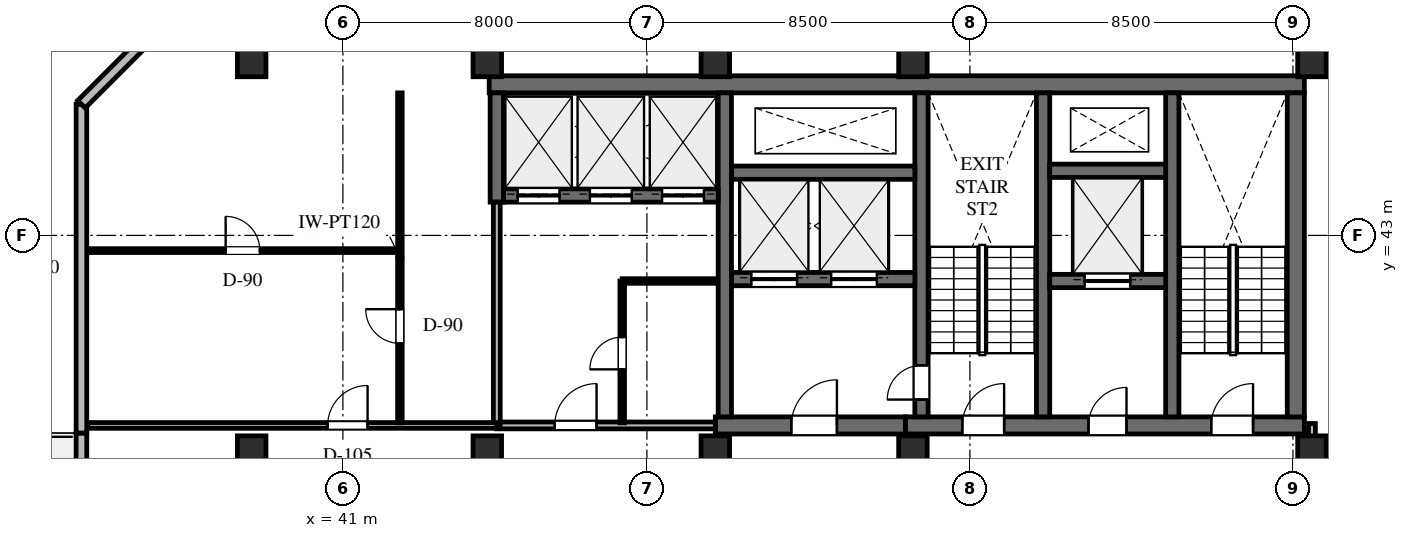
"""IFC4 building model, lengths in metres.
Left out: names, types, materials, properties, quantities, classifications, styles, units other than length and angle.
Written with IfcOpenShell. Run it as: python <this file> out.ifc"""

import sys

from ifc_helpers import new_model, si_unit, direction, frame, frame_2d, origin, origin_2d, place, context, subcontext, project, spatial, rectangle, extrude, element, fill, save


model = new_model("IFC4")
c1 = context("Model", 3, precision=1e-05, world=origin(), true_north=direction((0.0, 1.0)))
c2 = subcontext(c1, "Body", "Model", "MODEL_VIEW")
j1 = project(units=[si_unit("LENGTHUNIT", "METRE"), si_unit("PLANEANGLEUNIT", "RADIAN")], contexts=[c1])
p1 = place(None, origin())
s1 = spatial("IfcSite", under=j1, at=p1, CompositionType="ELEMENT")
p2 = place(p1, origin())
s2 = spatial("IfcBuilding", under=s1, at=p2, CompositionType="ELEMENT")
p3 = place(p2, frame((0.0, 0.0, 296.7)))
s3 = spatial("IfcBuildingStorey", under=s2, at=p3, CompositionType="ELEMENT", Elevation=296.7)
p4 = place(p3, frame((44.85, 46.975, 0.0), z_axis=(0.0, 0.0, 1.0), x_axis=(1.0, 0.0, 0.0)))
e1 = element("IfcWall", 1, at=p4, inside=s3, PredefinedType="SHEAR", context=c2, shape_type="SweptSolid", body=[
    extrude(rectangle(XDim=21.45, YDim=0.45, at=frame_2d((10.725, 0.0))), origin(), (0.0, 0.0, 1.0), 3.6),
])
p5 = place(p3, frame((55.8, 38.0, 0.0), z_axis=(0.0, 0.0, 1.0), x_axis=(1.0, 0.0, 0.0)))
e2 = element("IfcWall", 2, at=p5, inside=s3, PredefinedType="SHEAR", context=c2, shape_type="SweptSolid", body=[
    extrude(rectangle(XDim=10.5, YDim=0.45, at=frame_2d((5.25, 0.0))), origin(), (0.0, 0.0, 1.0), 3.6),
])
p6 = place(p5, frame((1.5, 0.0, 0.0)))
e3 = element("IfcOpeningElement", 3, at=p6, cuts=e2, PredefinedType="OPENING", context=c2, shape_type="SweptSolid", body=[
    extrude(rectangle(XDim=1.1, YDim=2.2, at=frame_2d((0.55, 1.1))), frame((0.0, 0.235, 0.0), z_axis=(0.0, -1.0, 0.0), x_axis=(1.0, 0.0, 0.0)), (0.0, 0.0, 1.0), 0.47),
])
p7 = place(p5, frame((4.82, 0.0, 0.0)))
e4 = element("IfcOpeningElement", 4, at=p7, cuts=e2, PredefinedType="OPENING", context=c2, shape_type="SweptSolid", body=[
    extrude(rectangle(XDim=1.0, YDim=2.15, at=frame_2d((0.5, 1.075))), frame((0.0, 0.235, 0.0), z_axis=(0.0, -1.0, 0.0), x_axis=(1.0, 0.0, 0.0)), (0.0, 0.0, 1.0), 0.47),
])
p8 = place(p5, frame((8.05, 0.0, 0.0)))
e5 = element("IfcOpeningElement", 5, at=p8, cuts=e2, PredefinedType="OPENING", context=c2, shape_type="SweptSolid", body=[
    extrude(rectangle(XDim=1.1, YDim=2.2, at=frame_2d((0.55, 1.1))), frame((0.0, 0.235, 0.0), z_axis=(0.0, -1.0, 0.0), x_axis=(1.0, 0.0, 0.0)), (0.0, 0.0, 1.0), 0.47),
])
p9 = place(p3, frame((66.075, 38.225, 0.0), z_axis=(0.0, 0.0, 1.0), x_axis=(0.0, 1.0, 0.0)))
e6 = element("IfcWall", 6, at=p9, inside=s3, PredefinedType="SHEAR", context=c2, shape_type="SweptSolid", body=[
    extrude(rectangle(XDim=8.525, YDim=0.45, at=frame_2d((4.262, 0.0))), origin(), (0.0, 0.0, 1.0), 3.6),
])
for number, where, z_axis, x_axis in (
    (7, (62.825, 38.225, 0.0), (0.0, 0.0, 1.0), (0.0, 1.0, 0.0)),
    (8, (59.425, 38.225, 0.0), (0.0, 0.0, 1.0), (0.0, 1.0, 0.0)),
):
    element("IfcWall", number, at=place(p3, frame(where, z_axis=z_axis, x_axis=x_axis)), inside=s3, PredefinedType="SHEAR", context=c2, shape_type="SweptSolid", body=[
        extrude(rectangle(XDim=8.525, YDim=0.35, at=frame_2d((4.262, 0.0))), origin(), (0.0, 0.0, 1.0), 3.6),
    ])
p10 = place(p3, frame((56.225, 38.225, 0.0), z_axis=(0.0, 0.0, 1.0), x_axis=(0.0, 1.0, 0.0)))
e9 = element("IfcWall", 9, at=p10, inside=s3, PredefinedType="SHEAR", context=c2, shape_type="SweptSolid", body=[
    extrude(rectangle(XDim=8.525, YDim=0.35, at=frame_2d((4.262, 0.0))), origin(), (0.0, 0.0, 1.0), 3.6),
])
p11 = place(p10, frame((0.455, 0.0, 0.0)))
e10 = element("IfcOpeningElement", 10, at=p11, cuts=e9, PredefinedType="OPENING", context=c2, shape_type="SweptSolid", body=[
    extrude(rectangle(XDim=0.9, YDim=2.15, at=frame_2d((0.45, 1.075))), frame((0.0, 0.185, 0.0), z_axis=(0.0, -1.0, 0.0), x_axis=(1.0, 0.0, 0.0)), (0.0, 0.0, 1.0), 0.37),
])
p12 = place(p3, frame((59.6, 41.8, 0.0), z_axis=(0.0, 0.0, 1.0), x_axis=(1.0, 0.0, 0.0)))
e11 = element("IfcWall", 11, at=p12, inside=s3, PredefinedType="SHEAR", context=c2, shape_type="SweptSolid", body=[
    extrude(rectangle(XDim=3.05, YDim=0.35, at=frame_2d((1.525, 0.0))), origin(), (0.0, 0.0, 1.0), 3.6),
])
p13 = place(p12, frame((0.92, 0.0, 0.0)))
e12 = element("IfcOpeningElement", 12, at=p13, cuts=e11, PredefinedType="OPENING", context=c2, shape_type="SweptSolid", body=[
    extrude(rectangle(XDim=1.2, YDim=2.2, at=frame_2d((0.6, 1.1))), frame((0.0, 0.185, 0.0), z_axis=(0.0, -1.0, 0.0), x_axis=(1.0, 0.0, 0.0)), (0.0, 0.0, 1.0), 0.37),
])
p14 = place(p3, frame((59.6, 44.7, 0.0), z_axis=(0.0, 0.0, 1.0), x_axis=(1.0, 0.0, 0.0)))
e13 = element("IfcWall", 13, at=p14, inside=s3, PredefinedType="SHEAR", context=c2, shape_type="SweptSolid", body=[
    extrude(rectangle(XDim=3.05, YDim=0.35, at=frame_2d((1.525, 0.0))), origin(), (0.0, 0.0, 1.0), 3.6),
])
p15 = place(p3, frame((50.8, 38.0, 0.0), z_axis=(0.0, 0.0, 1.0), x_axis=(1.0, 0.0, 0.0)))
e14 = element("IfcWall", 14, at=p15, inside=s3, PredefinedType="SHEAR", context=c2, shape_type="SweptSolid", body=[
    extrude(rectangle(XDim=5.0, YDim=0.45, at=frame_2d((2.5, 0.0))), origin(), (0.0, 0.0, 1.0), 3.6),
])
p16 = place(p15, frame((2.0, 0.0, 0.0)))
e15 = element("IfcOpeningElement", 15, at=p16, cuts=e14, PredefinedType="OPENING", context=c2, shape_type="SweptSolid", body=[
    extrude(rectangle(XDim=1.2, YDim=2.2, at=frame_2d((0.6, 1.1))), frame((0.0, 0.235, 0.0), z_axis=(0.0, -1.0, 0.0), x_axis=(1.0, 0.0, 0.0)), (0.0, 0.0, 1.0), 0.47),
])
p17 = place(p3, frame((51.225, 41.85, 0.0), z_axis=(0.0, 0.0, 1.0), x_axis=(1.0, 0.0, 0.0)))
e16 = element("IfcWall", 16, at=p17, inside=s3, PredefinedType="SHEAR", context=c2, shape_type="SweptSolid", body=[
    extrude(rectangle(XDim=4.825, YDim=0.35, at=frame_2d((2.413, 0.0))), origin(), (0.0, 0.0, 1.0), 3.6),
])
p18 = place(p17, frame((0.525, 0.0, 0.0)))
e17 = element("IfcOpeningElement", 17, at=p18, cuts=e16, PredefinedType="OPENING", context=c2, shape_type="SweptSolid", body=[
    extrude(rectangle(XDim=1.2, YDim=2.2, at=frame_2d((0.6, 1.1))), frame((0.0, 0.185, 0.0), z_axis=(0.0, -1.0, 0.0), x_axis=(1.0, 0.0, 0.0)), (0.0, 0.0, 1.0), 0.37),
])
p19 = place(p17, frame((2.625, 0.0, 0.0)))
e18 = element("IfcOpeningElement", 18, at=p19, cuts=e16, PredefinedType="OPENING", context=c2, shape_type="SweptSolid", body=[
    extrude(rectangle(XDim=1.2, YDim=2.2, at=frame_2d((0.6, 1.1))), frame((0.0, 0.185, 0.0), z_axis=(0.0, -1.0, 0.0), x_axis=(1.0, 0.0, 0.0)), (0.0, 0.0, 1.0), 0.37),
])
p20 = place(p3, frame((51.225, 44.65, 0.0), z_axis=(0.0, 0.0, 1.0), x_axis=(1.0, 0.0, 0.0)))
e19 = element("IfcWall", 19, at=p20, inside=s3, PredefinedType="SHEAR", context=c2, shape_type="SweptSolid", body=[
    extrude(rectangle(XDim=4.825, YDim=0.35, at=frame_2d((2.413, 0.0))), origin(), (0.0, 0.0, 1.0), 3.6),
])
p21 = place(p3, frame((51.05, 38.225, 0.0), z_axis=(0.0, 0.0, 1.0), x_axis=(0.0, 1.0, 0.0)))
e20 = element("IfcWall", 20, at=p21, inside=s3, PredefinedType="SHEAR", context=c2, shape_type="SweptSolid", body=[
    extrude(rectangle(XDim=8.525, YDim=0.35, at=frame_2d((4.262, 0.0))), origin(), (0.0, 0.0, 1.0), 3.6),
])
p22 = place(p3, frame((45.225, 44.05, 0.0), z_axis=(0.0, 0.0, 1.0), x_axis=(1.0, 0.0, 0.0)))
e21 = element("IfcWall", 21, at=p22, inside=s3, PredefinedType="SHEAR", context=c2, shape_type="SweptSolid", body=[
    extrude(rectangle(XDim=5.65, YDim=0.35, at=frame_2d((2.825, 0.0))), origin(), (0.0, 0.0, 1.0), 3.6),
])
p23 = place(p22, frame((0.375, 0.0, 0.0)))
e22 = element("IfcOpeningElement", 22, at=p23, cuts=e21, PredefinedType="OPENING", context=c2, shape_type="SweptSolid", body=[
    extrude(rectangle(XDim=1.1, YDim=2.2, at=frame_2d((0.55, 1.1))), frame((0.0, 0.185, 0.0), z_axis=(0.0, -1.0, 0.0), x_axis=(1.0, 0.0, 0.0)), (0.0, 0.0, 1.0), 0.37),
])
p24 = place(p22, frame((2.275, 0.0, 0.0)))
e23 = element("IfcOpeningElement", 23, at=p24, cuts=e21, PredefinedType="OPENING", context=c2, shape_type="SweptSolid", body=[
    extrude(rectangle(XDim=1.1, YDim=2.2, at=frame_2d((0.55, 1.1))), frame((0.0, 0.185, 0.0), z_axis=(0.0, -1.0, 0.0), x_axis=(1.0, 0.0, 0.0)), (0.0, 0.0, 1.0), 0.37),
])
p25 = place(p22, frame((4.175, 0.0, 0.0)))
e24 = element("IfcOpeningElement", 24, at=p25, cuts=e21, PredefinedType="OPENING", context=c2, shape_type="SweptSolid", body=[
    extrude(rectangle(XDim=1.1, YDim=2.2, at=frame_2d((0.55, 1.1))), frame((0.0, 0.185, 0.0), z_axis=(0.0, -1.0, 0.0), x_axis=(1.0, 0.0, 0.0)), (0.0, 0.0, 1.0), 0.37),
])
p26 = place(p3, frame((45.05, 43.875, 0.0), z_axis=(0.0, 0.0, 1.0), x_axis=(0.0, 1.0, 0.0)))
e25 = element("IfcWall", 25, at=p26, inside=s3, PredefinedType="SHEAR", context=c2, shape_type="SweptSolid", body=[
    extrude(rectangle(XDim=2.875, YDim=0.35, at=frame_2d((1.438, 0.0))), origin(), (0.0, 0.0, 1.0), 3.6),
])
for number, where, z_axis, x_axis in (
    (26, (66.5, 47.55, 0.0), (0.0, 0.0, 1.0), (1.0, 0.0, 0.0)),
    (27, (56.0, 47.55, 0.0), (0.0, 0.0, 1.0), (1.0, 0.0, 0.0)),
    (28, (66.5, 37.35, 0.0), (0.0, 0.0, 1.0), (1.0, 0.0, 0.0)),
    (29, (56.0, 37.35, 0.0), (0.0, 0.0, 1.0), (1.0, 0.0, 0.0)),
    (30, (50.8, 47.55, 0.0), (0.0, 0.0, 1.0), (1.0, 0.0, 0.0)),
    (31, (50.8, 37.35, 0.0), (0.0, 0.0, 1.0), (1.0, 0.0, 0.0)),
    (32, (44.8, 37.35, 0.0), (0.0, 0.0, 1.0), (1.0, 0.0, 0.0)),
    (33, (44.8, 47.55, 0.0), (0.0, 0.0, 1.0), (1.0, 0.0, 0.0)),
    (34, (38.6, 37.35, 0.0), (0.0, 0.0, 1.0), (1.0, 0.0, 0.0)),
    (35, (38.6, 47.55, 0.0), (0.0, 0.0, 1.0), (1.0, 0.0, 0.0)),
):
    element("IfcColumn", number, at=place(p3, frame(where, z_axis=z_axis, x_axis=x_axis)), inside=s3, PredefinedType="COLUMN", context=c2, shape_type="SweptSolid", body=[
        extrude(rectangle(XDim=0.75, YDim=0.75, at=origin_2d()), origin(), (0.0, 0.0, 1.0), 3.6),
    ])
p27 = place(p3, frame((34.12, 20.7, 0.0), z_axis=(0.0, 0.0, 1.0), x_axis=(0.0, 1.0, 0.0)))
e36 = element("IfcWall", 36, at=p27, inside=s3, PredefinedType="STANDARD", context=c2, shape_type="SweptSolid", body=[
    extrude(rectangle(XDim=17.1, YDim=0.28, at=frame_2d((8.55, 0.0))), origin(), (0.0, 0.0, 1.0), 3.365),
])
p28 = place(p27, frame((7.94, 0.0, 0.0)))
e37 = element("IfcOpeningElement", 37, at=p28, cuts=e36, PredefinedType="OPENING", context=c2, shape_type="SweptSolid", body=[
    extrude(rectangle(XDim=1.1, YDim=2.2, at=frame_2d((0.55, 1.1))), frame((0.0, 0.15, 0.0), z_axis=(0.0, -1.0, 0.0), x_axis=(1.0, 0.0, 0.0)), (0.0, 0.0, 1.0), 0.3),
])
p29 = place(p27, frame((2.897, 0.0, 0.65)))
e38 = element("IfcOpeningElement", 38, at=p29, cuts=e36, PredefinedType="OPENING", context=c2, shape_type="SweptSolid", body=[
    extrude(rectangle(XDim=1.8, YDim=2.1, at=frame_2d((0.9, 1.05))), frame((0.0, 0.15, 0.0), z_axis=(0.0, -1.0, 0.0), x_axis=(1.0, 0.0, 0.0)), (0.0, 0.0, 1.0), 0.3),
])
p30 = place(p3, frame((34.12, 37.8, 0.0), z_axis=(0.0, 0.0, 1.0), x_axis=(0.0, 1.0, 0.0)))
e39 = element("IfcWall", 39, at=p30, inside=s3, PredefinedType="STANDARD", context=c2, shape_type="SweptSolid", body=[
    extrude(rectangle(XDim=8.65, YDim=0.28, at=frame_2d((4.325, 0.0))), origin(), (0.0, 0.0, 1.0), 3.365),
])
p31 = place(p3, frame((34.12, 46.45, 0.0), z_axis=(0.0, 0.0, 1.0), x_axis=(0.707106781187, 0.707106781187, 0.0)))
e40 = element("IfcWall", 40, at=p31, inside=s3, PredefinedType="STANDARD", context=c2, shape_type="SweptSolid", body=[
    extrude(rectangle(XDim=2.729, YDim=0.28, at=frame_2d((1.365, 0.0))), origin(), (0.0, 0.0, 1.0), 3.365),
])
p32 = place(p3, frame((45.05, 38.0, 0.0), z_axis=(0.0, 0.0, 1.0), x_axis=(1.0, 0.0, 0.0)))
e41 = element("IfcWall", 41, at=p32, inside=s3, PredefinedType="STANDARD", context=c2, shape_type="SweptSolid", body=[
    extrude(rectangle(XDim=5.75, YDim=0.18, at=frame_2d((2.875, 0.0))), origin(), (0.0, 0.0, 1.0), 2.754),
])
p33 = place(p32, frame((1.525, 0.0, 0.0)))
e42 = element("IfcOpeningElement", 42, at=p33, cuts=e41, PredefinedType="OPENING", context=c2, shape_type="SweptSolid", body=[
    extrude(rectangle(XDim=1.1, YDim=2.2, at=frame_2d((0.55, 1.1))), frame((0.0, 0.1, 0.0), z_axis=(0.0, -1.0, 0.0), x_axis=(1.0, 0.0, 0.0)), (0.0, 0.0, 1.0), 0.2),
])
p34 = place(p3, frame((48.35, 38.068, 0.0), z_axis=(0.0, 0.0, 1.0), x_axis=(0.0, 1.0, 0.0)))
e43 = element("IfcWall", 43, at=p34, inside=s3, PredefinedType="PARTITIONING", context=c2, shape_type="SweptSolid", body=[
    extrude(rectangle(XDim=3.732, YDim=0.12, at=frame_2d((1.866, 0.0))), origin(), (0.0, 0.0, 1.0), 3.365),
])
p35 = place(p34, frame((1.407, 0.0, 0.0)))
e44 = element("IfcOpeningElement", 44, at=p35, cuts=e43, PredefinedType="OPENING", context=c2, shape_type="SweptSolid", body=[
    extrude(rectangle(XDim=0.85, YDim=2.1, at=frame_2d((0.425, 1.05))), frame((0.0, 0.07, 0.0), z_axis=(0.0, -1.0, 0.0), x_axis=(1.0, 0.0, 0.0)), (0.0, 0.0, 1.0), 0.14),
])
p36 = place(p3, frame((48.35, 41.8, 0.0), z_axis=(0.0, 0.0, 1.0), x_axis=(1.0, 0.0, 0.0)))
e45 = element("IfcWall", 45, at=p36, inside=s3, PredefinedType="PARTITIONING", context=c2, shape_type="SweptSolid", body=[
    extrude(rectangle(XDim=2.5, YDim=0.12, at=frame_2d((1.25, 0.0))), origin(), (0.0, 0.0, 1.0), 2.754),
])
p37 = place(p3, frame((45.05, 38.0, 0.0), z_axis=(0.0, 0.0, 1.0), x_axis=(0.0, 1.0, 0.0)))
e46 = element("IfcWall", 46, at=p37, inside=s3, PredefinedType="STANDARD", context=c2, shape_type="SweptSolid", body=[
    extrude(rectangle(XDim=5.875, YDim=0.18, at=frame_2d((2.938, 0.0))), origin(), (0.0, 0.0, 1.0), 2.754),
])
p38 = place(p3, frame((34.285, 38.0, 0.0), z_axis=(0.0, 0.0, 1.0), x_axis=(1.0, 0.0, 0.0)))
e47 = element("IfcWall", 47, at=p38, inside=s3, PredefinedType="PARTITIONING", context=c2, shape_type="SweptSolid", body=[
    extrude(rectangle(XDim=10.765, YDim=0.15, at=frame_2d((5.383, 0.0))), origin(), (0.0, 0.0, 1.0), 2.754),
])
p39 = place(p38, frame((6.315, 0.0, 0.0)))
e48 = element("IfcOpeningElement", 48, at=p39, cuts=e47, PredefinedType="OPENING", context=c2, shape_type="SweptSolid", body=[
    extrude(rectangle(XDim=1.05, YDim=2.2, at=frame_2d((0.525, 1.1))), frame((0.0, 0.085, 0.0), z_axis=(0.0, -1.0, 0.0), x_axis=(1.0, 0.0, 0.0)), (0.0, 0.0, 1.0), 0.17),
])
p40 = place(p3, frame((42.5, 38.068, 0.0), z_axis=(0.0, 0.0, 1.0), x_axis=(0.0, 1.0, 0.0)))
e49 = element("IfcWall", 49, at=p40, inside=s3, PredefinedType="PARTITIONING", context=c2, shape_type="SweptSolid", body=[
    extrude(rectangle(XDim=8.682, YDim=0.12, at=frame_2d((4.341, 0.0))), origin(), (0.0, 0.0, 1.0), 3.365),
])
p41 = place(p40, frame((2.091, 0.0, 0.0)))
e50 = element("IfcOpeningElement", 50, at=p41, cuts=e49, PredefinedType="OPENING", context=c2, shape_type="SweptSolid", body=[
    extrude(rectangle(XDim=0.9, YDim=2.1, at=frame_2d((0.45, 1.05))), frame((0.0, 0.07, 0.0), z_axis=(0.0, -1.0, 0.0), x_axis=(1.0, 0.0, 0.0)), (0.0, 0.0, 1.0), 0.14),
])
p42 = place(p3, frame((34.378, 42.6, 0.0), z_axis=(0.0, 0.0, 1.0), x_axis=(1.0, 0.0, 0.0)))
e51 = element("IfcWall", 51, at=p42, inside=s3, PredefinedType="PARTITIONING", context=c2, shape_type="SweptSolid", body=[
    extrude(rectangle(XDim=8.054, YDim=0.1, at=frame_2d((4.027, 0.0))), origin(), (0.0, 0.0, 1.0), 2.754),
])
p43 = place(p42, frame((3.537, 0.0, 0.0)))
e52 = element("IfcOpeningElement", 52, at=p43, cuts=e51, PredefinedType="OPENING", context=c2, shape_type="SweptSolid", body=[
    extrude(rectangle(XDim=0.9, YDim=2.1, at=frame_2d((0.45, 1.05))), frame((0.0, 0.06, 0.0), z_axis=(0.0, -1.0, 0.0), x_axis=(1.0, 0.0, 0.0)), (0.0, 0.0, 1.0), 0.12),
])
p44 = place(p3, frame((66.5, 35.468, 0.0), z_axis=(0.0, 0.0, 1.0), x_axis=(0.0, 1.0, 0.0)))
e53 = element("IfcWall", 53, at=p44, inside=s3, PredefinedType="STANDARD", context=c2, shape_type="SweptSolid", body=[
    extrude(rectangle(XDim=2.582, YDim=0.18, at=frame_2d((1.291, 0.0))), origin(), (0.0, 0.0, 1.0), 2.754),
])
p45 = place(p6, origin())
e54 = element("IfcDoor", 54, at=p45, inside=s3, OperationType="SINGLE_SWING_RIGHT", PredefinedType="DOOR", context=c2, shape_type="SweptSolid", body=[
    extrude(rectangle(XDim=1.1, YDim=2.2, at=frame_2d((0.55, 1.1))), frame((0.0, 0.025, 0.0), z_axis=(0.0, -1.0, 0.0), x_axis=(1.0, 0.0, 0.0)), (0.0, 0.0, 1.0), 0.05),
])
fill(e3, e54)
p46 = place(p7, origin())
e55 = element("IfcDoor", 55, at=p46, inside=s3, OperationType="SINGLE_SWING_RIGHT", PredefinedType="DOOR", context=c2, shape_type="SweptSolid", body=[
    extrude(rectangle(XDim=1.0, YDim=2.15, at=frame_2d((0.5, 1.075))), frame((0.0, 0.025, 0.0), z_axis=(0.0, -1.0, 0.0), x_axis=(1.0, 0.0, 0.0)), (0.0, 0.0, 1.0), 0.05),
])
fill(e4, e55)
p47 = place(p8, origin())
e56 = element("IfcDoor", 56, at=p47, inside=s3, OperationType="SINGLE_SWING_RIGHT", PredefinedType="DOOR", context=c2, shape_type="SweptSolid", body=[
    extrude(rectangle(XDim=1.1, YDim=2.2, at=frame_2d((0.55, 1.1))), frame((0.0, 0.025, 0.0), z_axis=(0.0, -1.0, 0.0), x_axis=(1.0, 0.0, 0.0)), (0.0, 0.0, 1.0), 0.05),
])
fill(e5, e56)
p48 = place(p16, origin())
e57 = element("IfcDoor", 57, at=p48, inside=s3, OperationType="SINGLE_SWING_RIGHT", PredefinedType="DOOR", context=c2, shape_type="SweptSolid", body=[
    extrude(rectangle(XDim=1.2, YDim=2.2, at=frame_2d((0.6, 1.1))), frame((0.0, 0.025, 0.0), z_axis=(0.0, -1.0, 0.0), x_axis=(1.0, 0.0, 0.0)), (0.0, 0.0, 1.0), 0.05),
])
fill(e15, e57)
p49 = place(p11, origin())
e58 = element("IfcDoor", 58, at=p49, inside=s3, OperationType="SINGLE_SWING_LEFT", PredefinedType="DOOR", context=c2, shape_type="SweptSolid", body=[
    extrude(rectangle(XDim=0.9, YDim=2.15, at=frame_2d((0.45, 1.075))), frame((0.0, 0.025, 0.0), z_axis=(0.0, -1.0, 0.0), x_axis=(1.0, 0.0, 0.0)), (0.0, 0.0, 1.0), 0.05),
])
fill(e10, e58)
p50 = place(p23, origin())
e59 = element("IfcDoor", 59, at=p50, inside=s3, OperationType="DOUBLE_DOOR_SLIDING", PredefinedType="DOOR", context=c2, shape_type="SweptSolid", body=[
    extrude(rectangle(XDim=1.1, YDim=2.2, at=frame_2d((0.55, 1.1))), frame((0.0, 0.025, 0.0), z_axis=(0.0, -1.0, 0.0), x_axis=(1.0, 0.0, 0.0)), (0.0, 0.0, 1.0), 0.05),
])
fill(e22, e59)
p51 = place(p24, origin())
e60 = element("IfcDoor", 60, at=p51, inside=s3, OperationType="DOUBLE_DOOR_SLIDING", PredefinedType="DOOR", context=c2, shape_type="SweptSolid", body=[
    extrude(rectangle(XDim=1.1, YDim=2.2, at=frame_2d((0.55, 1.1))), frame((0.0, 0.025, 0.0), z_axis=(0.0, -1.0, 0.0), x_axis=(1.0, 0.0, 0.0)), (0.0, 0.0, 1.0), 0.05),
])
fill(e23, e60)
p52 = place(p25, origin())
e61 = element("IfcDoor", 61, at=p52, inside=s3, OperationType="DOUBLE_DOOR_SLIDING", PredefinedType="DOOR", context=c2, shape_type="SweptSolid", body=[
    extrude(rectangle(XDim=1.1, YDim=2.2, at=frame_2d((0.55, 1.1))), frame((0.0, 0.025, 0.0), z_axis=(0.0, -1.0, 0.0), x_axis=(1.0, 0.0, 0.0)), (0.0, 0.0, 1.0), 0.05),
])
fill(e24, e61)
p53 = place(p18, origin())
e62 = element("IfcDoor", 62, at=p53, inside=s3, OperationType="DOUBLE_DOOR_SLIDING", PredefinedType="DOOR", context=c2, shape_type="SweptSolid", body=[
    extrude(rectangle(XDim=1.2, YDim=2.2, at=frame_2d((0.6, 1.1))), frame((0.0, 0.025, 0.0), z_axis=(0.0, -1.0, 0.0), x_axis=(1.0, 0.0, 0.0)), (0.0, 0.0, 1.0), 0.05),
])
fill(e17, e62)
p54 = place(p19, origin())
e63 = element("IfcDoor", 63, at=p54, inside=s3, OperationType="DOUBLE_DOOR_SLIDING", PredefinedType="DOOR", context=c2, shape_type="SweptSolid", body=[
    extrude(rectangle(XDim=1.2, YDim=2.2, at=frame_2d((0.6, 1.1))), frame((0.0, 0.025, 0.0), z_axis=(0.0, -1.0, 0.0), x_axis=(1.0, 0.0, 0.0)), (0.0, 0.0, 1.0), 0.05),
])
fill(e18, e63)
p55 = place(p13, origin())
e64 = element("IfcDoor", 64, at=p55, inside=s3, OperationType="DOUBLE_DOOR_SLIDING", PredefinedType="DOOR", context=c2, shape_type="SweptSolid", body=[
    extrude(rectangle(XDim=1.2, YDim=2.2, at=frame_2d((0.6, 1.1))), frame((0.0, 0.025, 0.0), z_axis=(0.0, -1.0, 0.0), x_axis=(1.0, 0.0, 0.0)), (0.0, 0.0, 1.0), 0.05),
])
fill(e12, e64)
p56 = place(p33, origin())
e65 = element("IfcDoor", 65, at=p56, inside=s3, OperationType="SINGLE_SWING_RIGHT", PredefinedType="DOOR", context=c2, shape_type="SweptSolid", body=[
    extrude(rectangle(XDim=1.1, YDim=2.2, at=frame_2d((0.55, 1.1))), frame((0.0, 0.025, 0.0), z_axis=(0.0, -1.0, 0.0), x_axis=(1.0, 0.0, 0.0)), (0.0, 0.0, 1.0), 0.05),
])
fill(e42, e65)
p57 = place(p35, origin())
e66 = element("IfcDoor", 66, at=p57, inside=s3, OperationType="SINGLE_SWING_LEFT", PredefinedType="DOOR", context=c2, shape_type="SweptSolid", body=[
    extrude(rectangle(XDim=0.85, YDim=2.1, at=frame_2d((0.425, 1.05))), frame((0.0, 0.025, 0.0), z_axis=(0.0, -1.0, 0.0), x_axis=(1.0, 0.0, 0.0)), (0.0, 0.0, 1.0), 0.05),
])
fill(e44, e66)
p58 = place(p39, origin())
e67 = element("IfcDoor", 67, at=p58, inside=s3, OperationType="SINGLE_SWING_RIGHT", PredefinedType="DOOR", context=c2, shape_type="SweptSolid", body=[
    extrude(rectangle(XDim=1.05, YDim=2.2, at=frame_2d((0.525, 1.1))), frame((0.0, 0.025, 0.0), z_axis=(0.0, -1.0, 0.0), x_axis=(1.0, 0.0, 0.0)), (0.0, 0.0, 1.0), 0.05),
])
fill(e48, e67)
p59 = place(p43, origin())
e68 = element("IfcDoor", 68, at=p59, inside=s3, OperationType="SINGLE_SWING_LEFT", PredefinedType="DOOR", context=c2, shape_type="SweptSolid", body=[
    extrude(rectangle(XDim=0.9, YDim=2.1, at=frame_2d((0.45, 1.05))), frame((0.0, 0.025, 0.0), z_axis=(0.0, -1.0, 0.0), x_axis=(1.0, 0.0, 0.0)), (0.0, 0.0, 1.0), 0.05),
])
fill(e52, e68)
p60 = place(p41, origin())
e69 = element("IfcDoor", 69, at=p60, inside=s3, OperationType="SINGLE_SWING_RIGHT", PredefinedType="DOOR", context=c2, shape_type="SweptSolid", body=[
    extrude(rectangle(XDim=0.9, YDim=2.1, at=frame_2d((0.45, 1.05))), frame((0.0, 0.025, 0.0), z_axis=(0.0, -1.0, 0.0), x_axis=(1.0, 0.0, 0.0)), (0.0, 0.0, 1.0), 0.05),
])
fill(e50, e69)
save(model, sys.argv[1])
